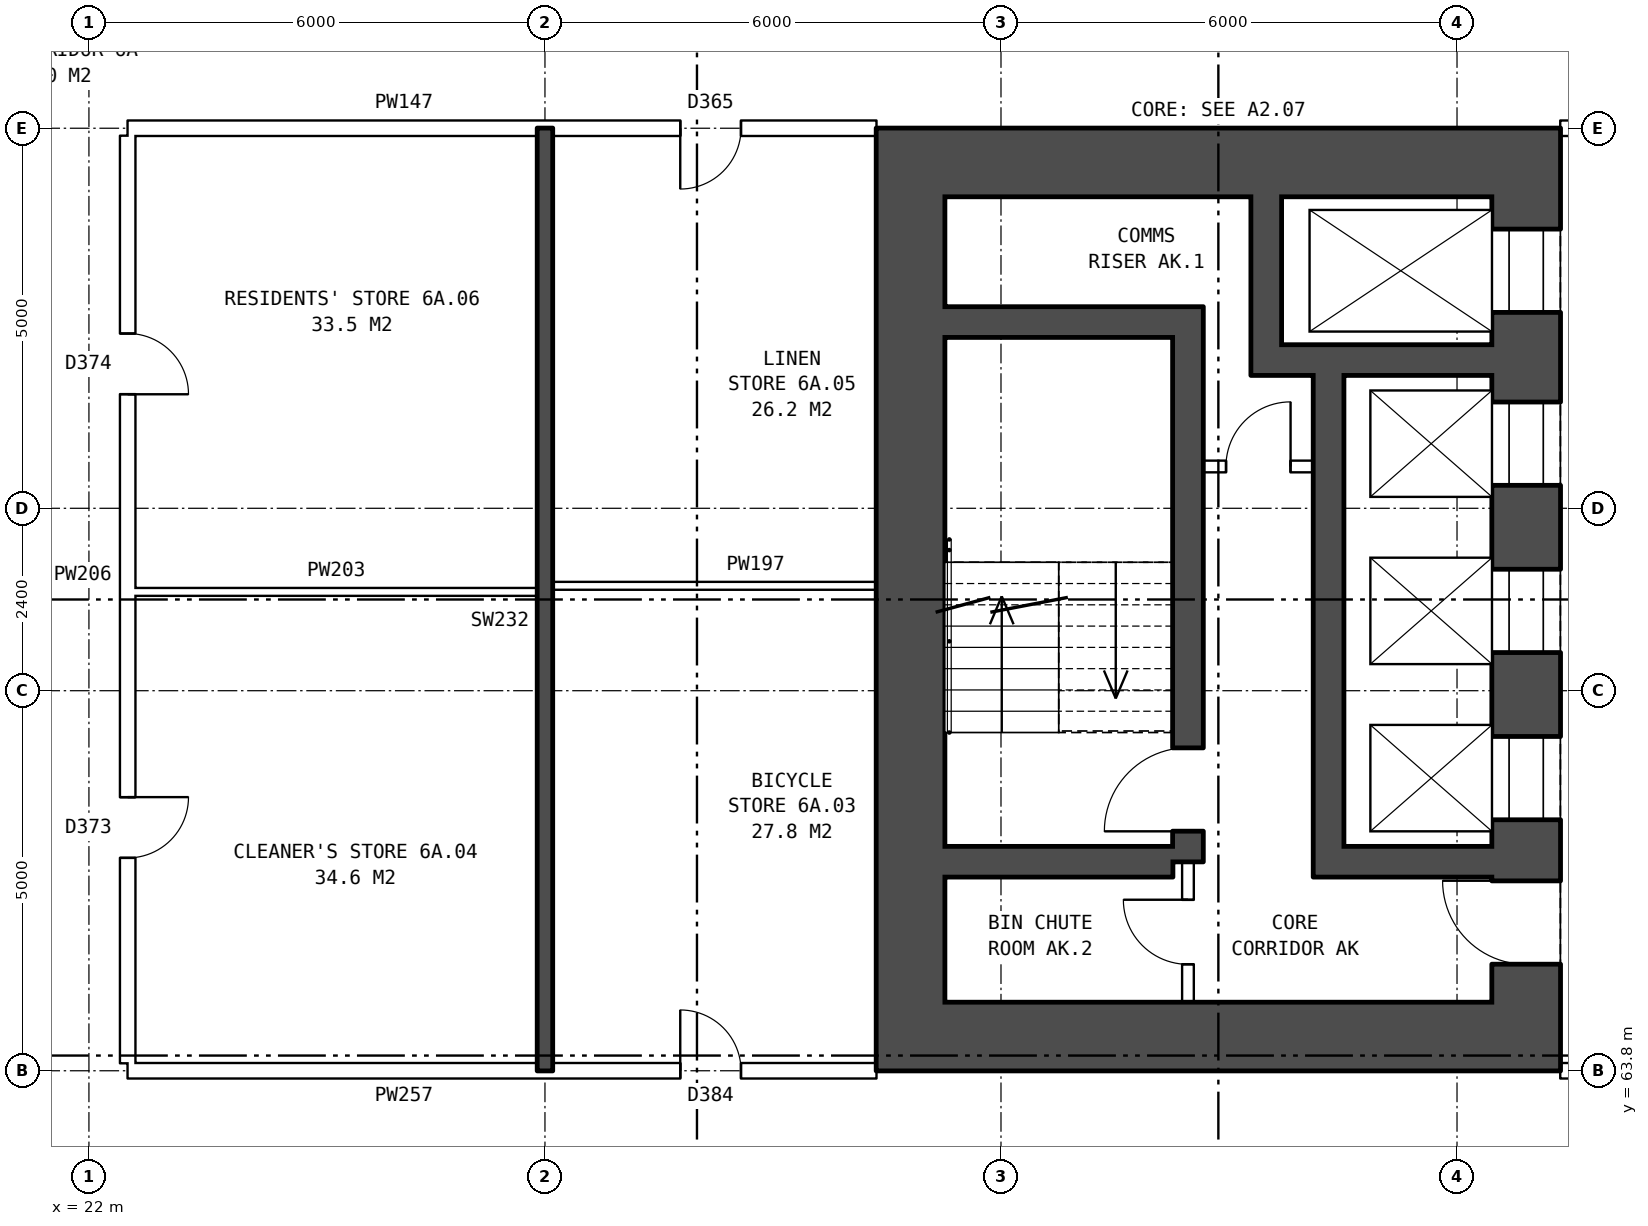
"""IFC4 building model, lengths in metres.
Left out: names, types, materials, properties, quantities, classifications, styles, units other than length and angle.
Written with IfcOpenShell. Run it as: python <this file> out.ifc"""

import sys

from ifc_helpers import new_model, si_unit, direction, frame, frame_2d, origin, place, context, subcontext, project, spatial, rectangle, extrude, element, fill, save


model = new_model("IFC4")
c1 = context("Model", 3, precision=1e-05, world=origin(), true_north=direction((0.0, 1.0)))
c2 = subcontext(c1, "Body", "Model", "MODEL_VIEW")
j1 = project(units=[si_unit("LENGTHUNIT", "METRE"), si_unit("PLANEANGLEUNIT", "RADIAN")], contexts=[c1])
p1 = place(None, origin())
s1 = spatial("IfcSite", under=j1, at=p1, CompositionType="ELEMENT")
p2 = place(p1, origin())
s2 = spatial("IfcBuilding", under=s1, at=p2, CompositionType="ELEMENT")
p3 = place(p2, frame((0.0, 0.0, 25.7)))
s3 = spatial("IfcBuildingStorey", under=s2, at=p3, CompositionType="ELEMENT", Elevation=25.7)
p4 = place(p3, frame((40.91, 75.3, 0.0), z_axis=(0.0, 0.0, 1.0), x_axis=(0.0, -1.0, 0.0)))
e1 = element("IfcWall", 1, at=p4, inside=s3, PredefinedType="SHEAR", context=c2, shape_type="SweptSolid", body=[
    extrude(rectangle(XDim=10.6, YDim=0.9, at=frame_2d((5.3, 0.0))), origin(), (0.0, 0.0, 1.0), 2.85),
])
p5 = place(p4, frame((0.425, 0.0, 0.0)))
e2 = element("IfcOpeningElement", 2, at=p5, cuts=e1, PredefinedType="OPENING", context=c2, shape_type="SweptSolid", body=[
    extrude(rectangle(XDim=1.1, YDim=2.1, at=frame_2d((0.55, 1.05))), frame((0.0, 0.46, 0.0), z_axis=(0.0, -1.0, 0.0), x_axis=(1.0, 0.0, 0.0)), (0.0, 0.0, 1.0), 0.92),
])
p6 = place(p4, frame((2.7, 0.0, 0.0)))
e3 = element("IfcOpeningElement", 3, at=p6, cuts=e1, PredefinedType="OPENING", context=c2, shape_type="SweptSolid", body=[
    extrude(rectangle(XDim=1.1, YDim=2.1, at=frame_2d((0.55, 1.05))), frame((0.0, 0.46, 0.0), z_axis=(0.0, -1.0, 0.0), x_axis=(1.0, 0.0, 0.0)), (0.0, 0.0, 1.0), 0.92),
])
p7 = place(p4, frame((4.9, 0.0, 0.0)))
e4 = element("IfcOpeningElement", 4, at=p7, cuts=e1, PredefinedType="OPENING", context=c2, shape_type="SweptSolid", body=[
    extrude(rectangle(XDim=1.1, YDim=2.1, at=frame_2d((0.55, 1.05))), frame((0.0, 0.46, 0.0), z_axis=(0.0, -1.0, 0.0), x_axis=(1.0, 0.0, 0.0)), (0.0, 0.0, 1.0), 0.92),
])
p8 = place(p4, frame((7.1, 0.0, 0.0)))
e5 = element("IfcOpeningElement", 5, at=p8, cuts=e1, PredefinedType="OPENING", context=c2, shape_type="SweptSolid", body=[
    extrude(rectangle(XDim=1.1, YDim=2.1, at=frame_2d((0.55, 1.05))), frame((0.0, 0.46, 0.0), z_axis=(0.0, -1.0, 0.0), x_axis=(1.0, 0.0, 0.0)), (0.0, 0.0, 1.0), 0.92),
])
p9 = place(p4, frame((9.0, 0.0, 0.0)))
e6 = element("IfcOpeningElement", 6, at=p9, cuts=e1, PredefinedType="OPENING", context=c2, shape_type="SweptSolid", body=[
    extrude(rectangle(XDim=1.1, YDim=2.1, at=frame_2d((0.55, 1.05))), frame((0.0, 0.46, 0.0), z_axis=(0.0, -1.0, 0.0), x_axis=(1.0, 0.0, 0.0)), (0.0, 0.0, 1.0), 0.92),
])
p10 = place(p3, frame((32.81, 75.3, 0.0), z_axis=(0.0, 0.0, 1.0), x_axis=(0.0, -1.0, 0.0)))
e7 = element("IfcWall", 7, at=p10, inside=s3, PredefinedType="SHEAR", context=c2, shape_type="SweptSolid", body=[
    extrude(rectangle(XDim=10.6, YDim=0.9, at=frame_2d((5.3, 0.0))), origin(), (0.0, 0.0, 1.0), 2.85),
])
for number, where, z_axis, x_axis in (
    (8, (41.36, 75.75, 0.0), (0.0, 0.0, 1.0), (-1.0, 0.0, 0.0)),
    (9, (41.36, 64.25, 0.0), (0.0, 0.0, 1.0), (-1.0, 0.0, 0.0)),
):
    element("IfcWall", number, at=place(p3, frame(where, z_axis=z_axis, x_axis=x_axis)), inside=s3, PredefinedType="SHEAR", context=c2, shape_type="SweptSolid", body=[
        extrude(rectangle(XDim=9.0, YDim=0.9, at=frame_2d((4.5, 0.0))), origin(), (0.0, 0.0, 1.0), 2.85),
    ])
p11 = place(p3, frame((36.26, 73.65, 0.0), z_axis=(0.0, 0.0, 1.0), x_axis=(-1.0, 0.0, 0.0)))
e10 = element("IfcWall", 10, at=p11, inside=s3, PredefinedType="SHEAR", context=c2, shape_type="SweptSolid", body=[
    extrude(rectangle(XDim=3.0, YDim=0.4, at=frame_2d((1.5, 0.0))), origin(), (0.0, 0.0, 1.0), 2.85),
])
p12 = place(p3, frame((40.46, 73.15, 0.0), z_axis=(0.0, 0.0, 1.0), x_axis=(-1.0, 0.0, 0.0)))
e11 = element("IfcWall", 11, at=p12, inside=s3, PredefinedType="SHEAR", context=c2, shape_type="SweptSolid", body=[
    extrude(rectangle(XDim=3.17, YDim=0.4, at=frame_2d((1.585, 0.0))), origin(), (0.0, 0.0, 1.0), 2.85),
])
p13 = place(p3, frame((38.11, 71.75, 0.0), z_axis=(0.0, 0.0, 1.0), x_axis=(-1.0, 0.0, 0.0)))
e12 = element("IfcWall", 12, at=p13, inside=s3, PredefinedType="PARTITIONING", context=c2, shape_type="SweptSolid", body=[
    extrude(rectangle(XDim=1.45, YDim=0.15, at=frame_2d((0.725, 0.0))), origin(), (0.0, 0.0, 1.0), 2.85),
])
p14 = place(p13, frame((0.3, 0.0, 0.0)))
e13 = element("IfcOpeningElement", 13, at=p14, cuts=e12, PredefinedType="OPENING", context=c2, shape_type="SweptSolid", body=[
    extrude(rectangle(XDim=0.85, YDim=2.1, at=frame_2d((0.425, 1.05))), frame((0.0, 0.085, 0.0), z_axis=(0.0, -1.0, 0.0), x_axis=(1.0, 0.0, 0.0)), (0.0, 0.0, 1.0), 0.17),
])
p15 = place(p3, frame((40.46, 66.55, 0.0), z_axis=(0.0, 0.0, 1.0), x_axis=(-1.0, 0.0, 0.0)))
e14 = element("IfcWall", 14, at=p15, inside=s3, PredefinedType="SHEAR", context=c2, shape_type="SweptSolid", body=[
    extrude(rectangle(XDim=1.95, YDim=0.4, at=frame_2d((0.975, 0.0))), origin(), (0.0, 0.0, 1.0), 2.85),
])
p16 = place(p3, frame((36.26, 66.55, 0.0), z_axis=(0.0, 0.0, 1.0), x_axis=(-1.0, 0.0, 0.0)))
e15 = element("IfcWall", 15, at=p16, inside=s3, PredefinedType="SHEAR", context=c2, shape_type="SweptSolid", body=[
    extrude(rectangle(XDim=3.0, YDim=0.4, at=frame_2d((1.5, 0.0))), origin(), (0.0, 0.0, 1.0), 2.85),
])
p17 = place(p3, frame((38.31, 72.95, 0.0), z_axis=(0.0, 0.0, 1.0), x_axis=(0.0, -1.0, 0.0)))
e16 = element("IfcWall", 16, at=p17, inside=s3, PredefinedType="SHEAR", context=c2, shape_type="SweptSolid", body=[
    extrude(rectangle(XDim=6.6, YDim=0.4, at=frame_2d((3.3, 0.0))), origin(), (0.0, 0.0, 1.0), 2.85),
])
p18 = place(p3, frame((37.49, 75.3, 0.0), z_axis=(0.0, 0.0, 1.0), x_axis=(0.0, -1.0, 0.0)))
e17 = element("IfcWall", 17, at=p18, inside=s3, PredefinedType="SHEAR", context=c2, shape_type="SweptSolid", body=[
    extrude(rectangle(XDim=1.95, YDim=0.4, at=frame_2d((0.975, 0.0))), origin(), (0.0, 0.0, 1.0), 2.85),
])
p19 = place(p3, frame((36.46, 73.85, 0.0), z_axis=(0.0, 0.0, 1.0), x_axis=(0.0, -1.0, 0.0)))
e18 = element("IfcWall", 18, at=p19, inside=s3, PredefinedType="SHEAR", context=c2, shape_type="SweptSolid", body=[
    extrude(rectangle(XDim=7.3, YDim=0.4, at=frame_2d((3.65, 0.0))), origin(), (0.0, 0.0, 1.0), 2.85),
])
p20 = place(p19, frame((5.8, 0.0, 0.0)))
e19 = element("IfcOpeningElement", 19, at=p20, cuts=e18, PredefinedType="OPENING", context=c2, shape_type="SweptSolid", body=[
    extrude(rectangle(XDim=1.1, YDim=2.1, at=frame_2d((0.55, 1.05))), frame((0.0, 0.21, 0.0), z_axis=(0.0, -1.0, 0.0), x_axis=(1.0, 0.0, 0.0)), (0.0, 0.0, 1.0), 0.42),
])
p21 = place(p3, frame((36.46, 66.55, 0.0), z_axis=(0.0, 0.0, 1.0), x_axis=(0.0, -1.0, 0.0)))
e20 = element("IfcWall", 20, at=p21, inside=s3, PredefinedType="PARTITIONING", context=c2, shape_type="SweptSolid", body=[
    extrude(rectangle(XDim=1.85, YDim=0.15, at=frame_2d((0.925, 0.0))), origin(), (0.0, 0.0, 1.0), 2.85),
])
p22 = place(p21, frame((0.5, 0.0, 0.0)))
e21 = element("IfcOpeningElement", 21, at=p22, cuts=e20, PredefinedType="OPENING", context=c2, shape_type="SweptSolid", body=[
    extrude(rectangle(XDim=0.85, YDim=2.1, at=frame_2d((0.425, 1.05))), frame((0.0, 0.085, 0.0), z_axis=(0.0, -1.0, 0.0), x_axis=(1.0, 0.0, 0.0)), (0.0, 0.0, 1.0), 0.17),
])
p23 = place(p3, frame((22.51, 63.8, 0.0), z_axis=(0.0, 0.0, 1.0), x_axis=(1.0, 0.0, 0.0)))
e22 = element("IfcWall", 22, at=p23, inside=s3, PredefinedType="PARTITIONING", context=c2, shape_type="SweptSolid", body=[
    extrude(rectangle(XDim=9.85, YDim=0.2, at=frame_2d((4.925, 0.0))), origin(), (0.0, 0.0, 1.0), 2.85),
])
p24 = place(p23, frame((7.27, 0.0, 0.0)))
e23 = element("IfcOpeningElement", 23, at=p24, cuts=e22, PredefinedType="OPENING", context=c2, shape_type="SweptSolid", body=[
    extrude(rectangle(XDim=0.8, YDim=2.1, at=frame_2d((0.4, 1.05))), frame((0.0, 0.11, 0.0), z_axis=(0.0, -1.0, 0.0), x_axis=(1.0, 0.0, 0.0)), (0.0, 0.0, 1.0), 0.22),
])
p25 = place(p3, frame((41.36, 63.8, 0.0), z_axis=(0.0, 0.0, 1.0), x_axis=(1.0, 0.0, 0.0)))
e24 = element("IfcWall", 24, at=p25, inside=s3, PredefinedType="PARTITIONING", context=c2, shape_type="SweptSolid", body=[
    extrude(rectangle(XDim=3.0, YDim=0.2, at=frame_2d((1.5, 0.0))), origin(), (0.0, 0.0, 1.0), 2.85),
])
p26 = place(p25, frame((1.0, 0.0, 0.0)))
e25 = element("IfcOpeningElement", 25, at=p26, cuts=e24, PredefinedType="OPENING", context=c2, shape_type="SweptSolid", body=[
    extrude(rectangle(XDim=1.0, YDim=2.1, at=frame_2d((0.5, 1.05))), frame((0.0, 0.11, 0.0), z_axis=(0.0, -1.0, 0.0), x_axis=(1.0, 0.0, 0.0)), (0.0, 0.0, 1.0), 0.22),
])
p27 = place(p3, frame((22.61, 70.1, 0.0), z_axis=(0.0, 0.0, 1.0), x_axis=(1.0, 0.0, 0.0)))
e26 = element("IfcWall", 26, at=p27, inside=s3, PredefinedType="PARTITIONING", context=c2, shape_type="SweptSolid", body=[
    extrude(rectangle(XDim=5.29, YDim=0.1, at=frame_2d((2.645, 0.0))), origin(), (0.0, 0.0, 1.0), 2.85),
])
p28 = place(p3, frame((28.1, 70.18, 0.0), z_axis=(0.0, 0.0, 1.0), x_axis=(1.0, 0.0, 0.0)))
e27 = element("IfcWall", 27, at=p28, inside=s3, PredefinedType="PARTITIONING", context=c2, shape_type="SweptSolid", body=[
    extrude(rectangle(XDim=4.26, YDim=0.1, at=frame_2d((2.13, 0.0))), origin(), (0.0, 0.0, 1.0), 2.85),
])
p29 = place(p3, frame((22.51, 76.2, 0.0), z_axis=(0.0, 0.0, 1.0), x_axis=(1.0, 0.0, 0.0)))
e28 = element("IfcWall", 28, at=p29, inside=s3, PredefinedType="PARTITIONING", context=c2, shape_type="SweptSolid", body=[
    extrude(rectangle(XDim=9.85, YDim=0.2, at=frame_2d((4.925, 0.0))), origin(), (0.0, 0.0, 1.0), 2.85),
])
p30 = place(p29, frame((7.27, 0.0, 0.0)))
e29 = element("IfcOpeningElement", 29, at=p30, cuts=e28, PredefinedType="OPENING", context=c2, shape_type="SweptSolid", body=[
    extrude(rectangle(XDim=0.8, YDim=2.1, at=frame_2d((0.4, 1.05))), frame((0.0, 0.11, 0.0), z_axis=(0.0, -1.0, 0.0), x_axis=(1.0, 0.0, 0.0)), (0.0, 0.0, 1.0), 0.22),
])
p31 = place(p3, frame((41.36, 76.2, 0.0), z_axis=(0.0, 0.0, 1.0), x_axis=(1.0, 0.0, 0.0)))
e30 = element("IfcWall", 30, at=p31, inside=s3, PredefinedType="PARTITIONING", context=c2, shape_type="SweptSolid", body=[
    extrude(rectangle(XDim=3.0, YDim=0.2, at=frame_2d((1.5, 0.0))), origin(), (0.0, 0.0, 1.0), 2.85),
])
p32 = place(p31, frame((1.0, 0.0, 0.0)))
e31 = element("IfcOpeningElement", 31, at=p32, cuts=e30, PredefinedType="OPENING", context=c2, shape_type="SweptSolid", body=[
    extrude(rectangle(XDim=1.0, YDim=2.1, at=frame_2d((0.5, 1.05))), frame((0.0, 0.11, 0.0), z_axis=(0.0, -1.0, 0.0), x_axis=(1.0, 0.0, 0.0)), (0.0, 0.0, 1.0), 0.22),
])
p33 = place(p3, frame((22.51, 63.9, 0.0), z_axis=(0.0, 0.0, 1.0), x_axis=(0.0, 1.0, 0.0)))
e32 = element("IfcWall", 32, at=p33, inside=s3, PredefinedType="PARTITIONING", context=c2, shape_type="SweptSolid", body=[
    extrude(rectangle(XDim=12.2, YDim=0.2, at=frame_2d((6.1, 0.0))), origin(), (0.0, 0.0, 1.0), 2.85),
])
p34 = place(p33, frame((2.7, 0.0, 0.0)))
e33 = element("IfcOpeningElement", 33, at=p34, cuts=e32, PredefinedType="OPENING", context=c2, shape_type="SweptSolid", body=[
    extrude(rectangle(XDim=0.8, YDim=2.1, at=frame_2d((0.4, 1.05))), frame((0.0, 0.11, 0.0), z_axis=(0.0, -1.0, 0.0), x_axis=(1.0, 0.0, 0.0)), (0.0, 0.0, 1.0), 0.22),
])
p35 = place(p33, frame((8.8, 0.0, 0.0)))
e34 = element("IfcOpeningElement", 34, at=p35, cuts=e32, PredefinedType="OPENING", context=c2, shape_type="SweptSolid", body=[
    extrude(rectangle(XDim=0.8, YDim=2.1, at=frame_2d((0.4, 1.05))), frame((0.0, 0.11, 0.0), z_axis=(0.0, -1.0, 0.0), x_axis=(1.0, 0.0, 0.0)), (0.0, 0.0, 1.0), 0.22),
])
p36 = place(p3, frame((28.0, 63.8, 0.0), z_axis=(0.0, 0.0, 1.0), x_axis=(0.0, 1.0, 0.0)))
e35 = element("IfcWall", 35, at=p36, inside=s3, PredefinedType="SOLIDWALL", context=c2, shape_type="SweptSolid", body=[
    extrude(rectangle(XDim=12.4, YDim=0.2, at=frame_2d((6.2, 0.0))), origin(), (0.0, 0.0, 1.0), 2.85),
])
p37 = place(p5, origin())
e36 = element("IfcDoor", 36, at=p37, inside=s3, OperationType="DOUBLE_DOOR_SLIDING", PredefinedType="DOOR", context=c2, shape_type="SweptSolid", body=[
    extrude(rectangle(XDim=1.1, YDim=2.1, at=frame_2d((0.55, 1.05))), frame((0.0, -0.385, 0.0), z_axis=(0.0, -1.0, 0.0), x_axis=(1.0, 0.0, 0.0)), (0.0, 0.0, 1.0), 0.05),
])
fill(e2, e36)
p38 = place(p6, origin())
e37 = element("IfcDoor", 37, at=p38, inside=s3, OperationType="DOUBLE_DOOR_SLIDING", PredefinedType="DOOR", context=c2, shape_type="SweptSolid", body=[
    extrude(rectangle(XDim=1.1, YDim=2.1, at=frame_2d((0.55, 1.05))), frame((0.0, -0.385, 0.0), z_axis=(0.0, -1.0, 0.0), x_axis=(1.0, 0.0, 0.0)), (0.0, 0.0, 1.0), 0.05),
])
fill(e3, e37)
p39 = place(p7, origin())
e38 = element("IfcDoor", 38, at=p39, inside=s3, OperationType="DOUBLE_DOOR_SLIDING", PredefinedType="DOOR", context=c2, shape_type="SweptSolid", body=[
    extrude(rectangle(XDim=1.1, YDim=2.1, at=frame_2d((0.55, 1.05))), frame((0.0, -0.385, 0.0), z_axis=(0.0, -1.0, 0.0), x_axis=(1.0, 0.0, 0.0)), (0.0, 0.0, 1.0), 0.05),
])
fill(e4, e38)
p40 = place(p8, origin())
e39 = element("IfcDoor", 39, at=p40, inside=s3, OperationType="DOUBLE_DOOR_SLIDING", PredefinedType="DOOR", context=c2, shape_type="SweptSolid", body=[
    extrude(rectangle(XDim=1.1, YDim=2.1, at=frame_2d((0.55, 1.05))), frame((0.0, -0.385, 0.0), z_axis=(0.0, -1.0, 0.0), x_axis=(1.0, 0.0, 0.0)), (0.0, 0.0, 1.0), 0.05),
])
fill(e5, e39)
p41 = place(p9, frame((1.1, 0.0, 0.0), z_axis=(0.0, 0.0, 1.0), x_axis=(-1.0, 0.0, 0.0)))
e40 = element("IfcDoor", 40, at=p41, inside=s3, OperationType="SINGLE_SWING_RIGHT", PredefinedType="DOOR", context=c2, shape_type="SweptSolid", body=[
    extrude(rectangle(XDim=1.1, YDim=2.1, at=frame_2d((0.55, 1.05))), frame((0.0, 0.435, 0.0), z_axis=(0.0, -1.0, 0.0), x_axis=(1.0, 0.0, 0.0)), (0.0, 0.0, 1.0), 0.05),
])
fill(e6, e40)
p42 = place(p20, frame((1.1, 0.0, 0.0), z_axis=(0.0, 0.0, 1.0), x_axis=(-1.0, 0.0, 0.0)))
e41 = element("IfcDoor", 41, at=p42, inside=s3, OperationType="SINGLE_SWING_LEFT", PredefinedType="DOOR", context=c2, shape_type="SweptSolid", body=[
    extrude(rectangle(XDim=1.1, YDim=2.1, at=frame_2d((0.55, 1.05))), frame((0.0, 0.025, 0.0), z_axis=(0.0, -1.0, 0.0), x_axis=(1.0, 0.0, 0.0)), (0.0, 0.0, 1.0), 0.05),
])
fill(e19, e41)
p43 = place(p14, frame((0.85, 0.0, 0.0), z_axis=(0.0, 0.0, 1.0), x_axis=(-1.0, 0.0, 0.0)))
e42 = element("IfcDoor", 42, at=p43, inside=s3, OperationType="SINGLE_SWING_RIGHT", PredefinedType="DOOR", context=c2, shape_type="SweptSolid", body=[
    extrude(rectangle(XDim=0.85, YDim=2.1, at=frame_2d((0.425, 1.05))), frame((0.0, 0.025, 0.0), z_axis=(0.0, -1.0, 0.0), x_axis=(1.0, 0.0, 0.0)), (0.0, 0.0, 1.0), 0.05),
])
fill(e13, e42)
p44 = place(p22, frame((0.85, 0.0, 0.0), z_axis=(0.0, 0.0, 1.0), x_axis=(-1.0, 0.0, 0.0)))
e43 = element("IfcDoor", 43, at=p44, inside=s3, OperationType="SINGLE_SWING_RIGHT", PredefinedType="DOOR", context=c2, shape_type="SweptSolid", body=[
    extrude(rectangle(XDim=0.85, YDim=2.1, at=frame_2d((0.425, 1.05))), frame((0.0, 0.025, 0.0), z_axis=(0.0, -1.0, 0.0), x_axis=(1.0, 0.0, 0.0)), (0.0, 0.0, 1.0), 0.05),
])
fill(e21, e43)
p45 = place(p24, origin())
e44 = element("IfcDoor", 44, at=p45, inside=s3, OperationType="SINGLE_SWING_LEFT", PredefinedType="DOOR", context=c2, shape_type="SweptSolid", body=[
    extrude(rectangle(XDim=0.8, YDim=2.1, at=frame_2d((0.4, 1.05))), frame((0.0, 0.025, 0.0), z_axis=(0.0, -1.0, 0.0), x_axis=(1.0, 0.0, 0.0)), (0.0, 0.0, 1.0), 0.05),
])
fill(e23, e44)
p46 = place(p34, frame((0.8, 0.0, 0.0), z_axis=(0.0, 0.0, 1.0), x_axis=(-1.0, 0.0, 0.0)))
e45 = element("IfcDoor", 45, at=p46, inside=s3, OperationType="SINGLE_SWING_LEFT", PredefinedType="DOOR", context=c2, shape_type="SweptSolid", body=[
    extrude(rectangle(XDim=0.8, YDim=2.1, at=frame_2d((0.4, 1.05))), frame((0.0, 0.025, 0.0), z_axis=(0.0, -1.0, 0.0), x_axis=(1.0, 0.0, 0.0)), (0.0, 0.0, 1.0), 0.05),
])
fill(e33, e45)
p47 = place(p30, frame((0.8, 0.0, 0.0), z_axis=(0.0, 0.0, 1.0), x_axis=(-1.0, 0.0, 0.0)))
e46 = element("IfcDoor", 46, at=p47, inside=s3, OperationType="SINGLE_SWING_RIGHT", PredefinedType="DOOR", context=c2, shape_type="SweptSolid", body=[
    extrude(rectangle(XDim=0.8, YDim=2.1, at=frame_2d((0.4, 1.05))), frame((0.0, 0.025, 0.0), z_axis=(0.0, -1.0, 0.0), x_axis=(1.0, 0.0, 0.0)), (0.0, 0.0, 1.0), 0.05),
])
fill(e29, e46)
p48 = place(p35, frame((0.8, 0.0, 0.0), z_axis=(0.0, 0.0, 1.0), x_axis=(-1.0, 0.0, 0.0)))
e47 = element("IfcDoor", 47, at=p48, inside=s3, OperationType="SINGLE_SWING_RIGHT", PredefinedType="DOOR", context=c2, shape_type="SweptSolid", body=[
    extrude(rectangle(XDim=0.8, YDim=2.1, at=frame_2d((0.4, 1.05))), frame((0.0, 0.025, 0.0), z_axis=(0.0, -1.0, 0.0), x_axis=(1.0, 0.0, 0.0)), (0.0, 0.0, 1.0), 0.05),
])
fill(e34, e47)
save(model, sys.argv[1])
